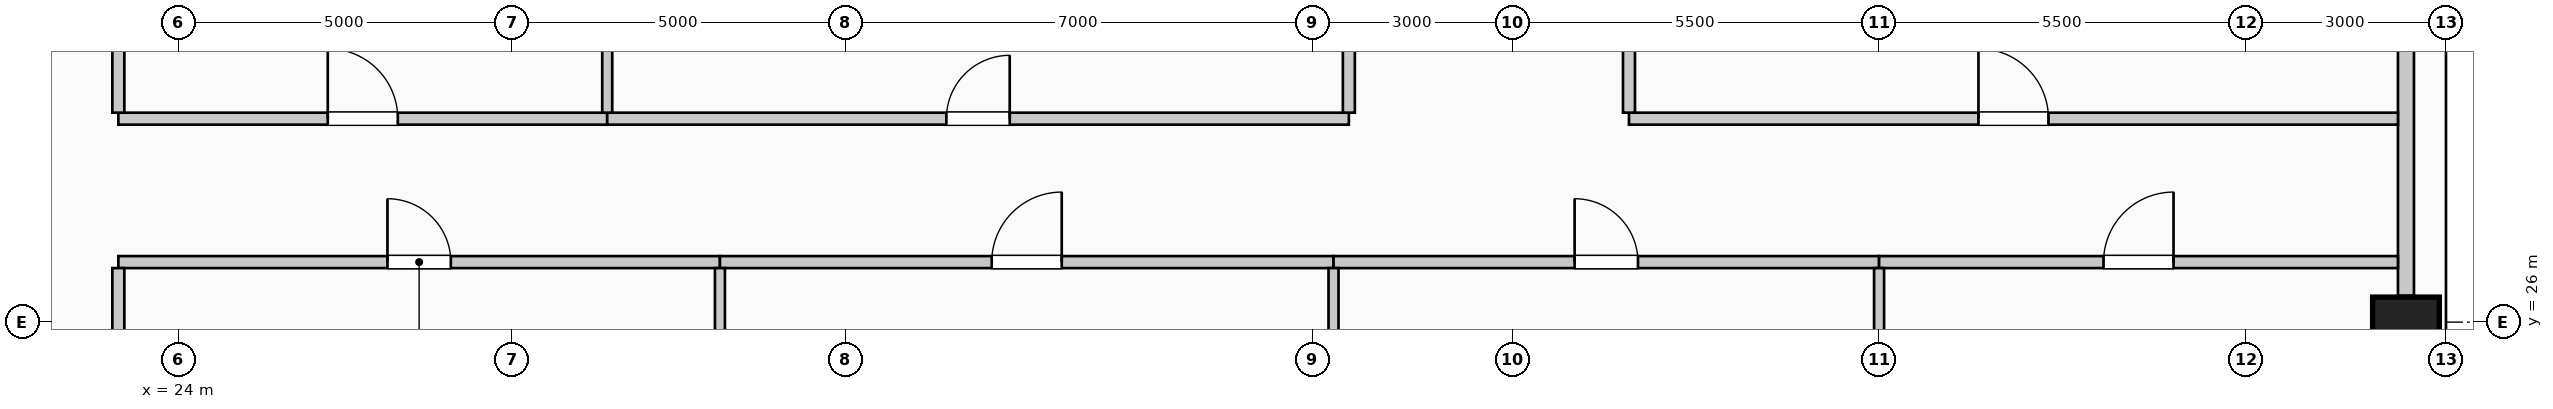
"""IFC4 building model, lengths in metres.
Left out: names, types, materials, properties, quantities, classifications, styles, units other than length and angle.
Written with IfcOpenShell. Run it as: python <this file> out.ifc"""

import sys

from ifc_helpers import new_model, si_unit, direction, frame, frame_2d, origin, origin_2d, place, context, subcontext, project, spatial, rectangle, extrude, element, fill, save


model = new_model("IFC4")
c1 = context("Model", 3, precision=1e-05, world=origin(), true_north=direction((0.0, 1.0)))
c2 = subcontext(c1, "Body", "Model", "MODEL_VIEW")
j1 = project(units=[si_unit("LENGTHUNIT", "METRE"), si_unit("PLANEANGLEUNIT", "RADIAN")], contexts=[c1])
p1 = place(None, origin())
s1 = spatial("IfcSite", under=j1, at=p1, CompositionType="ELEMENT")
p2 = place(p1, origin())
s2 = spatial("IfcBuilding", under=s1, at=p2, CompositionType="ELEMENT")
p3 = place(p2, frame((0.0, 0.0, 256.6)))
s3 = spatial("IfcBuildingStorey", under=s2, at=p3, CompositionType="ELEMENT", Elevation=256.6)
p4 = place(p3, frame((57.4, 26.0, 0.0), z_axis=(0.0, 0.0, 1.0), x_axis=(0.0, 1.0, 0.0)))
e1 = element("IfcColumn", 1, at=p4, inside=s3, PredefinedType="COLUMN", context=c2, shape_type="SweptSolid", body=[
    extrude(rectangle(XDim=0.75, YDim=1.0, at=origin_2d()), origin(), (0.0, 0.0, 1.0), 4.0),
])
p5 = place(p3, frame((57.4, 33.605, 0.0), z_axis=(0.0, 0.0, 1.0), x_axis=(0.0, -1.0, 0.0)))
e2 = element("IfcWall", 2, at=p5, inside=s3, PredefinedType="SOLIDWALL", context=c2, shape_type="SweptSolid", body=[
    extrude(rectangle(XDim=7.21, YDim=0.24, at=frame_2d((3.605, 0.0))), origin(), (0.0, 0.0, 1.0), 3.0),
])
p6 = place(p3, frame((23.1, 26.9, 0.0), z_axis=(0.0, 0.0, 1.0), x_axis=(1.0, 0.0, 0.0)))
e3 = element("IfcWall", 3, at=p6, inside=s3, PredefinedType="PARTITIONING", context=c2, shape_type="SweptSolid", body=[
    extrude(rectangle(XDim=9.02, YDim=0.18, at=frame_2d((4.51, 0.0))), origin(), (0.0, 0.0, 1.0), 3.75),
])
p7 = place(p6, frame((4.035, 0.0, 0.0)))
e4 = element("IfcOpeningElement", 4, at=p7, cuts=e3, PredefinedType="OPENING", context=c2, shape_type="SweptSolid", body=[
    extrude(rectangle(XDim=0.95, YDim=2.15, at=frame_2d((0.475, 1.075))), frame((0.0, 0.1, 0.0), z_axis=(0.0, -1.0, 0.0), x_axis=(1.0, 0.0, 0.0)), (0.0, 0.0, 1.0), 0.2),
])
p8 = place(p3, frame((32.12, 26.9, 0.0), z_axis=(0.0, 0.0, 1.0), x_axis=(1.0, 0.0, 0.0)))
e5 = element("IfcWall", 5, at=p8, inside=s3, PredefinedType="PARTITIONING", context=c2, shape_type="SweptSolid", body=[
    extrude(rectangle(XDim=9.2, YDim=0.18, at=frame_2d((4.6, 0.0))), origin(), (0.0, 0.0, 1.0), 3.75),
])
p9 = place(p8, frame((4.075, 0.0, 0.0)))
e6 = element("IfcOpeningElement", 6, at=p9, cuts=e5, PredefinedType="OPENING", context=c2, shape_type="SweptSolid", body=[
    extrude(rectangle(XDim=1.05, YDim=2.15, at=frame_2d((0.525, 1.075))), frame((0.0, 0.1, 0.0), z_axis=(0.0, -1.0, 0.0), x_axis=(1.0, 0.0, 0.0)), (0.0, 0.0, 1.0), 0.2),
])
p10 = place(p3, frame((41.32, 26.9, 0.0), z_axis=(0.0, 0.0, 1.0), x_axis=(1.0, 0.0, 0.0)))
e7 = element("IfcWall", 7, at=p10, inside=s3, PredefinedType="PARTITIONING", context=c2, shape_type="SweptSolid", body=[
    extrude(rectangle(XDim=8.18, YDim=0.18, at=frame_2d((4.09, 0.0))), origin(), (0.0, 0.0, 1.0), 3.75),
])
p11 = place(p10, frame((3.615, 0.0, 0.0)))
e8 = element("IfcOpeningElement", 8, at=p11, cuts=e7, PredefinedType="OPENING", context=c2, shape_type="SweptSolid", body=[
    extrude(rectangle(XDim=0.95, YDim=2.15, at=frame_2d((0.475, 1.075))), frame((0.0, 0.1, 0.0), z_axis=(0.0, -1.0, 0.0), x_axis=(1.0, 0.0, 0.0)), (0.0, 0.0, 1.0), 0.2),
])
p12 = place(p3, frame((49.5, 26.9, 0.0), z_axis=(0.0, 0.0, 1.0), x_axis=(1.0, 0.0, 0.0)))
e9 = element("IfcWall", 9, at=p12, inside=s3, PredefinedType="PARTITIONING", context=c2, shape_type="SweptSolid", body=[
    extrude(rectangle(XDim=7.78, YDim=0.18, at=frame_2d((3.89, 0.0))), origin(), (0.0, 0.0, 1.0), 3.75),
])
p13 = place(p12, frame((3.365, 0.0, 0.0)))
e10 = element("IfcOpeningElement", 10, at=p13, cuts=e9, PredefinedType="OPENING", context=c2, shape_type="SweptSolid", body=[
    extrude(rectangle(XDim=1.05, YDim=2.15, at=frame_2d((0.525, 1.075))), frame((0.0, 0.1, 0.0), z_axis=(0.0, -1.0, 0.0), x_axis=(1.0, 0.0, 0.0)), (0.0, 0.0, 1.0), 0.2),
])
p14 = place(p3, frame((23.1, 29.05, 0.0), z_axis=(0.0, 0.0, 1.0), x_axis=(1.0, 0.0, 0.0)))
e11 = element("IfcWall", 11, at=p14, inside=s3, PredefinedType="PARTITIONING", context=c2, shape_type="SweptSolid", body=[
    extrude(rectangle(XDim=7.33, YDim=0.18, at=frame_2d((3.665, 0.0))), origin(), (0.0, 0.0, 1.0), 3.75),
])
p15 = place(p14, frame((3.14, 0.0, 0.0)))
e12 = element("IfcOpeningElement", 12, at=p15, cuts=e11, PredefinedType="OPENING", context=c2, shape_type="SweptSolid", body=[
    extrude(rectangle(XDim=1.05, YDim=2.15, at=frame_2d((0.525, 1.075))), frame((0.0, 0.1, 0.0), z_axis=(0.0, -1.0, 0.0), x_axis=(1.0, 0.0, 0.0)), (0.0, 0.0, 1.0), 0.2),
])
p16 = place(p3, frame((30.43, 29.05, 0.0), z_axis=(0.0, 0.0, 1.0), x_axis=(1.0, 0.0, 0.0)))
e13 = element("IfcWall", 13, at=p16, inside=s3, PredefinedType="PARTITIONING", context=c2, shape_type="SweptSolid", body=[
    extrude(rectangle(XDim=11.12, YDim=0.18, at=frame_2d((5.56, 0.0))), origin(), (0.0, 0.0, 1.0), 3.75),
])
p17 = place(p16, frame((5.085, 0.0, 0.0)))
e14 = element("IfcOpeningElement", 14, at=p17, cuts=e13, PredefinedType="OPENING", context=c2, shape_type="SweptSolid", body=[
    extrude(rectangle(XDim=0.95, YDim=2.15, at=frame_2d((0.475, 1.075))), frame((0.0, 0.1, 0.0), z_axis=(0.0, -1.0, 0.0), x_axis=(1.0, 0.0, 0.0)), (0.0, 0.0, 1.0), 0.2),
])
p18 = place(p3, frame((45.75, 29.05, 0.0), z_axis=(0.0, 0.0, 1.0), x_axis=(1.0, 0.0, 0.0)))
e15 = element("IfcWall", 15, at=p18, inside=s3, PredefinedType="PARTITIONING", context=c2, shape_type="SweptSolid", body=[
    extrude(rectangle(XDim=11.53, YDim=0.18, at=frame_2d((5.765, 0.0))), origin(), (0.0, 0.0, 1.0), 3.75),
])
p19 = place(p18, frame((5.24, 0.0, 0.0)))
e16 = element("IfcOpeningElement", 16, at=p19, cuts=e15, PredefinedType="OPENING", context=c2, shape_type="SweptSolid", body=[
    extrude(rectangle(XDim=1.05, YDim=2.15, at=frame_2d((0.525, 1.075))), frame((0.0, 0.1, 0.0), z_axis=(0.0, -1.0, 0.0), x_axis=(1.0, 0.0, 0.0)), (0.0, 0.0, 1.0), 0.2),
])
p20 = place(p3, frame((23.1, 17.3, 0.0), z_axis=(0.0, 0.0, 1.0), x_axis=(0.0, 1.0, 0.0)))
e17 = element("IfcWall", 17, at=p20, inside=s3, PredefinedType="PARTITIONING", context=c2, shape_type="SweptSolid", body=[
    extrude(rectangle(XDim=9.51, YDim=0.18, at=frame_2d((4.755, 0.0))), origin(), (0.0, 0.0, 1.0), 3.75),
])
p21 = place(p3, frame((23.1, 29.14, 0.0), z_axis=(0.0, 0.0, 1.0), x_axis=(0.0, 1.0, 0.0)))
e18 = element("IfcWall", 18, at=p21, inside=s3, PredefinedType="PARTITIONING", context=c2, shape_type="SweptSolid", body=[
    extrude(rectangle(XDim=3.12, YDim=0.18, at=frame_2d((1.56, 0.0))), origin(), (0.0, 0.0, 1.0), 3.75),
])
p22 = place(p3, frame((30.43, 29.14, 0.0), z_axis=(0.0, 0.0, 1.0), x_axis=(0.0, 1.0, 0.0)))
e19 = element("IfcWall", 19, at=p22, inside=s3, PredefinedType="PARTITIONING", context=c2, shape_type="SweptSolid", body=[
    extrude(rectangle(XDim=16.14, YDim=0.15, at=frame_2d((8.07, 0.0))), origin(), (0.0, 0.0, 1.0), 3.75),
])
p23 = place(p3, frame((32.12, 0.72, 0.0), z_axis=(0.0, 0.0, 1.0), x_axis=(0.0, 1.0, 0.0)))
e20 = element("IfcWall", 20, at=p23, inside=s3, PredefinedType="PARTITIONING", context=c2, shape_type="SweptSolid", body=[
    extrude(rectangle(XDim=26.09, YDim=0.15, at=frame_2d((13.045, 0.0))), origin(), (0.0, 0.0, 1.0), 3.75),
])
p24 = place(p3, frame((41.32, 18.425, 0.0), z_axis=(0.0, 0.0, 1.0), x_axis=(0.0, 1.0, 0.0)))
e21 = element("IfcWall", 21, at=p24, inside=s3, PredefinedType="PARTITIONING", context=c2, shape_type="SweptSolid", body=[
    extrude(rectangle(XDim=8.385, YDim=0.15, at=frame_2d((4.192, 0.0))), origin(), (0.0, 0.0, 1.0), 3.195),
])
p25 = place(p3, frame((41.55, 29.14, 0.0), z_axis=(0.0, 0.0, 1.0), x_axis=(0.0, 1.0, 0.0)))
e22 = element("IfcWall", 22, at=p25, inside=s3, PredefinedType="PARTITIONING", context=c2, shape_type="SweptSolid", body=[
    extrude(rectangle(XDim=3.21, YDim=0.18, at=frame_2d((1.605, 0.0))), origin(), (0.0, 0.0, 1.0), 3.195),
])
p26 = place(p3, frame((45.75, 29.14, 0.0), z_axis=(0.0, 0.0, 1.0), x_axis=(0.0, 1.0, 0.0)))
e23 = element("IfcWall", 23, at=p26, inside=s3, PredefinedType="PARTITIONING", context=c2, shape_type="SweptSolid", body=[
    extrude(rectangle(XDim=3.135, YDim=0.18, at=frame_2d((1.567, 0.0))), origin(), (0.0, 0.0, 1.0), 3.75),
])
p27 = place(p3, frame((49.5, 1.1, 0.0), z_axis=(0.0, 0.0, 1.0), x_axis=(0.0, 1.0, 0.0)))
e24 = element("IfcWall", 24, at=p27, inside=s3, PredefinedType="PARTITIONING", context=c2, shape_type="SweptSolid", body=[
    extrude(rectangle(XDim=25.71, YDim=0.15, at=frame_2d((12.855, 0.0))), origin(), (0.0, 0.0, 1.0), 3.75),
])
p28 = place(p7, origin())
e25 = element("IfcDoor", 25, at=p28, inside=s3, OperationType="SINGLE_SWING_LEFT", PredefinedType="DOOR", context=c2, shape_type="SweptSolid", body=[
    extrude(rectangle(XDim=0.95, YDim=2.15, at=frame_2d((0.475, 1.075))), frame((0.0, 0.025, 0.0), z_axis=(0.0, -1.0, 0.0), x_axis=(1.0, 0.0, 0.0)), (0.0, 0.0, 1.0), 0.05),
])
fill(e4, e25)
p29 = place(p9, origin())
e26 = element("IfcDoor", 26, at=p29, inside=s3, OperationType="SINGLE_SWING_RIGHT", PredefinedType="DOOR", context=c2, shape_type="SweptSolid", body=[
    extrude(rectangle(XDim=1.05, YDim=2.15, at=frame_2d((0.525, 1.075))), frame((0.0, 0.025, 0.0), z_axis=(0.0, -1.0, 0.0), x_axis=(1.0, 0.0, 0.0)), (0.0, 0.0, 1.0), 0.05),
])
fill(e6, e26)
p30 = place(p11, origin())
e27 = element("IfcDoor", 27, at=p30, inside=s3, OperationType="SINGLE_SWING_LEFT", PredefinedType="DOOR", context=c2, shape_type="SweptSolid", body=[
    extrude(rectangle(XDim=0.95, YDim=2.15, at=frame_2d((0.475, 1.075))), frame((0.0, 0.025, 0.0), z_axis=(0.0, -1.0, 0.0), x_axis=(1.0, 0.0, 0.0)), (0.0, 0.0, 1.0), 0.05),
])
fill(e8, e27)
p31 = place(p13, origin())
e28 = element("IfcDoor", 28, at=p31, inside=s3, OperationType="SINGLE_SWING_RIGHT", PredefinedType="DOOR", context=c2, shape_type="SweptSolid", body=[
    extrude(rectangle(XDim=1.05, YDim=2.15, at=frame_2d((0.525, 1.075))), frame((0.0, 0.025, 0.0), z_axis=(0.0, -1.0, 0.0), x_axis=(1.0, 0.0, 0.0)), (0.0, 0.0, 1.0), 0.05),
])
fill(e10, e28)
p32 = place(p15, origin())
e29 = element("IfcDoor", 29, at=p32, inside=s3, OperationType="SINGLE_SWING_LEFT", PredefinedType="DOOR", context=c2, shape_type="SweptSolid", body=[
    extrude(rectangle(XDim=1.05, YDim=2.15, at=frame_2d((0.525, 1.075))), frame((0.0, 0.025, 0.0), z_axis=(0.0, -1.0, 0.0), x_axis=(1.0, 0.0, 0.0)), (0.0, 0.0, 1.0), 0.05),
])
fill(e12, e29)
p33 = place(p17, origin())
e30 = element("IfcDoor", 30, at=p33, inside=s3, OperationType="SINGLE_SWING_RIGHT", PredefinedType="DOOR", context=c2, shape_type="SweptSolid", body=[
    extrude(rectangle(XDim=0.95, YDim=2.15, at=frame_2d((0.475, 1.075))), frame((0.0, 0.025, 0.0), z_axis=(0.0, -1.0, 0.0), x_axis=(1.0, 0.0, 0.0)), (0.0, 0.0, 1.0), 0.05),
])
fill(e14, e30)
p34 = place(p19, origin())
e31 = element("IfcDoor", 31, at=p34, inside=s3, OperationType="SINGLE_SWING_LEFT", PredefinedType="DOOR", context=c2, shape_type="SweptSolid", body=[
    extrude(rectangle(XDim=1.05, YDim=2.15, at=frame_2d((0.525, 1.075))), frame((0.0, 0.025, 0.0), z_axis=(0.0, -1.0, 0.0), x_axis=(1.0, 0.0, 0.0)), (0.0, 0.0, 1.0), 0.05),
])
fill(e16, e31)
save(model, sys.argv[1])
